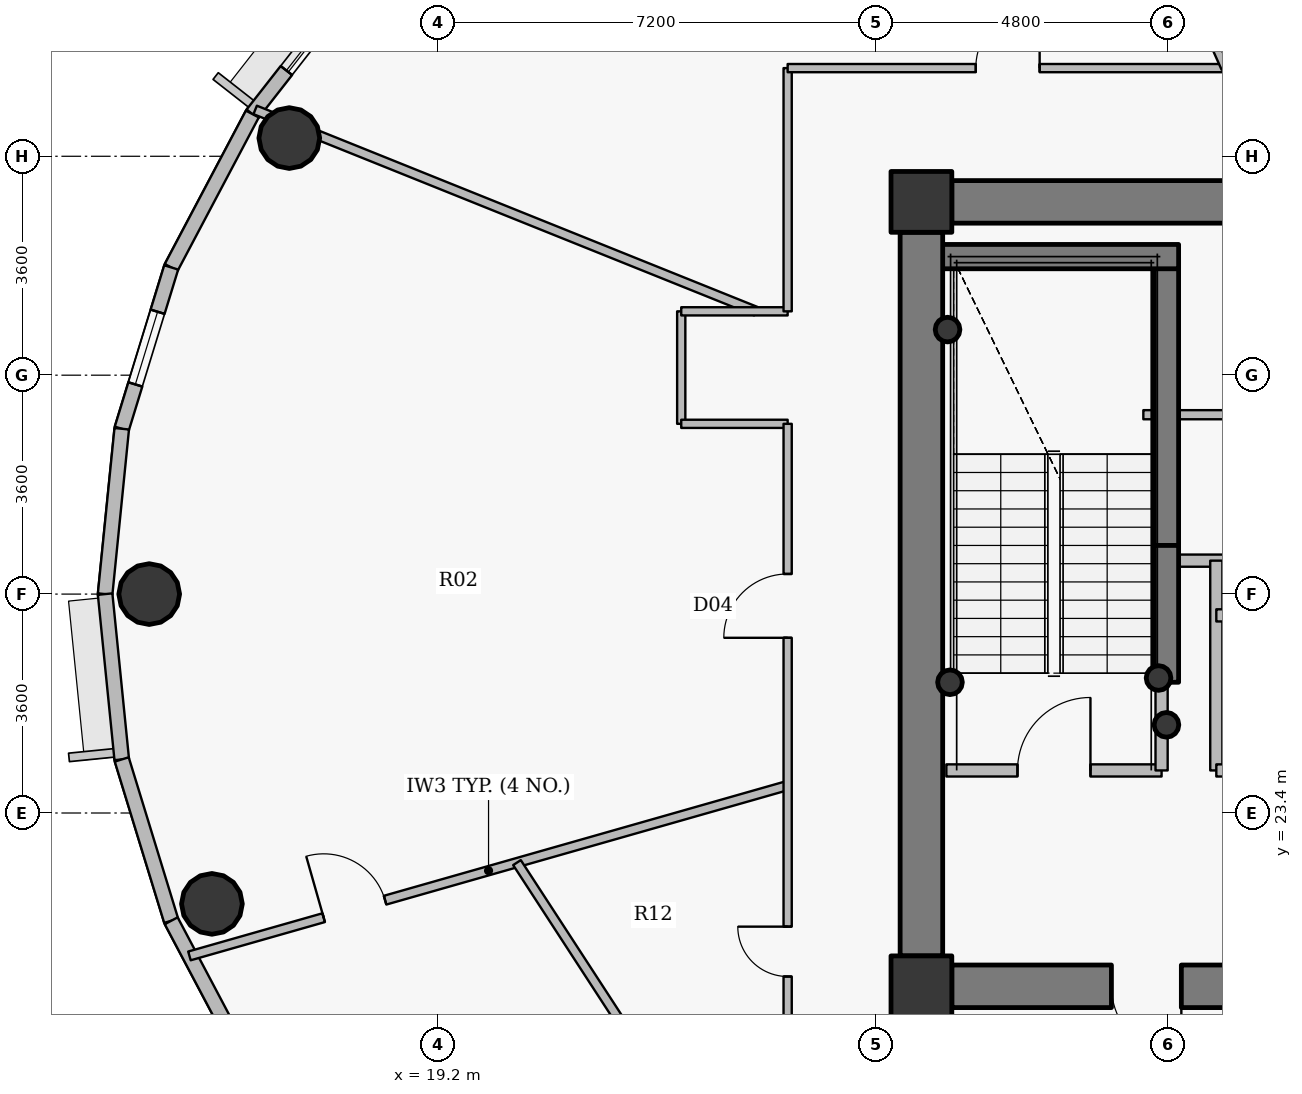
"""IFC4 building model, lengths in metres.
Left out: names, types, materials, properties, quantities, classifications, styles, units other than length and angle.
Written with IfcOpenShell. Run it as: python <this file> out.ifc"""

import sys

from ifc_helpers import new_model, si_unit, direction, frame, frame_2d, origin, origin_2d, place, context, subcontext, project, spatial, rectangle, hollow_circle, extrude, source, transform, mapped, element, fill, save


model = new_model("IFC4")
c1 = context("Model", 3, precision=1e-05, world=origin(), true_north=direction((0.0, 1.0)))
c2 = subcontext(c1, "Body", "Model", "MODEL_VIEW")
j1 = project(units=[si_unit("LENGTHUNIT", "METRE"), si_unit("PLANEANGLEUNIT", "RADIAN")], contexts=[c1])
p1 = place(None, origin())
s1 = spatial("IfcSite", under=j1, at=p1, CompositionType="ELEMENT")
p2 = place(p1, origin())
s2 = spatial("IfcBuilding", under=s1, at=p2, CompositionType="ELEMENT")
p3 = place(p2, frame((0.0, 0.0, 314.25)))
s3 = spatial("IfcBuildingStorey", under=s2, at=p3, CompositionType="ELEMENT", Elevation=314.25)
for number, where, z_axis, x_axis in (
    (1, (27.15, 20.55, 0.0), (0.0, 0.0, 1.0), (1.0, 0.0, 0.0)),
    (2, (27.15, 33.45, 0.0), (0.0, 0.0, 1.0), (1.0, 0.0, 0.0)),
):
    element("IfcColumn", number, at=place(p3, frame(where, z_axis=z_axis, x_axis=x_axis)), inside=s3, PredefinedType="COLUMN", context=c2, shape_type="SweptSolid", body=[
        extrude(rectangle(XDim=1.0, YDim=1.0, at=origin_2d()), origin(), (0.0, 0.0, 1.0), 3.75),
    ])
p4 = place(p3, frame((31.18, 27.8, 0.0), z_axis=(0.0, 0.0, 1.0), x_axis=(0.0, 1.0, 0.0)))
e3 = element("IfcWall", 3, at=p4, inside=s3, PredefinedType="SHEAR", context=c2, shape_type="SweptSolid", body=[
    extrude(rectangle(XDim=4.75, YDim=0.4, at=frame_2d((2.375, 0.0))), origin(), (0.0, 0.0, 1.0), 3.75),
])
p5 = place(p3, frame((27.25, 32.55, 0.0), z_axis=(0.0, 0.0, 1.0), x_axis=(1.0, 0.0, 0.0)))
e4 = element("IfcWall", 4, at=p5, inside=s3, PredefinedType="SHEAR", context=c2, shape_type="SweptSolid", body=[
    extrude(rectangle(XDim=4.13, YDim=0.4, at=frame_2d((2.065, 0.0))), origin(), (0.0, 0.0, 1.0), 3.75),
])
for number, where, z_axis, x_axis in (
    (5, (27.58, 31.35, 0.0), (0.0, 0.0, 1.0), (1.0, 0.0, 0.0)),
    (6, (31.05, 25.62, 0.0), (0.0, 0.0, 1.0), (1.0, 0.0, 0.0)),
    (7, (31.18, 24.85, 0.0), (0.0, 0.0, 1.0), (1.0, 0.0, 0.0)),
    (8, (27.62, 25.55, 0.0), (0.0, 0.0, 1.0), (1.0, 0.0, 0.0)),
):
    element("IfcColumn", number, at=place(p3, frame(where, z_axis=z_axis, x_axis=x_axis)), inside=s3, PredefinedType="COLUMN", context=c2, shape_type="SweptSolid", body=[
        extrude(hollow_circle(Radius=0.203, WallThickness=0.016, at=origin_2d()), origin(), (0.0, 0.0, 1.0), 3.75),
    ])
p6 = place(p3, frame((27.65, 33.45, 0.0), z_axis=(0.0, 0.0, 1.0), x_axis=(1.0, 0.0, 0.0)))
e9 = element("IfcWall", 9, at=p6, inside=s3, PredefinedType="SHEAR", context=c2, shape_type="SweptSolid", body=[
    extrude(rectangle(XDim=16.7, YDim=0.7, at=frame_2d((8.35, 0.0))), origin(), (0.0, 0.0, 1.0), 3.0),
])
p7 = place(p6, frame((12.775, 0.0, 0.0)))
e10 = element("IfcOpeningElement", 10, at=p7, cuts=e9, PredefinedType="OPENING", context=c2, shape_type="SweptSolid", body=[
    extrude(rectangle(XDim=1.15, YDim=2.15, at=origin_2d()), frame((0.575, 0.36, 1.075), z_axis=(0.0, -1.0, 0.0), x_axis=(1.0, 0.0, 0.0)), (0.0, 0.0, 1.0), 0.72),
])
p8 = place(p3, frame((44.35, 20.55, 0.0), z_axis=(0.0, 0.0, 1.0), x_axis=(-1.0, 0.0, 0.0)))
e11 = element("IfcWall", 11, at=p8, inside=s3, PredefinedType="SHEAR", context=c2, shape_type="SweptSolid", body=[
    extrude(rectangle(XDim=16.7, YDim=0.7, at=frame_2d((8.35, 0.0))), origin(), (0.0, 0.0, 1.0), 3.0),
])
p9 = place(p8, frame((12.925, 0.0, 0.0)))
e12 = element("IfcOpeningElement", 12, at=p9, cuts=e11, PredefinedType="OPENING", context=c2, shape_type="SweptSolid", body=[
    extrude(rectangle(XDim=1.15, YDim=2.15, at=origin_2d()), frame((0.575, 0.36, 1.075), z_axis=(0.0, -1.0, 0.0), x_axis=(1.0, 0.0, 0.0)), (0.0, 0.0, 1.0), 0.72),
])
p10 = place(p8, frame((9.1, 0.0, 0.0)))
e13 = element("IfcOpeningElement", 13, at=p10, cuts=e11, PredefinedType="OPENING", context=c2, shape_type="SweptSolid", body=[
    extrude(rectangle(XDim=1.15, YDim=2.15, at=origin_2d()), frame((0.575, 0.36, 1.075), z_axis=(0.0, -1.0, 0.0), x_axis=(1.0, 0.0, 0.0)), (0.0, 0.0, 1.0), 0.72),
])
p11 = place(p3, frame((27.15, 21.05, 0.0), z_axis=(0.0, 0.0, 1.0), x_axis=(0.0, 1.0, 0.0)))
e14 = element("IfcWall", 14, at=p11, inside=s3, PredefinedType="SHEAR", context=c2, shape_type="SweptSolid", body=[
    extrude(rectangle(XDim=11.9, YDim=0.7, at=frame_2d((5.95, 0.0))), origin(), (0.0, 0.0, 1.0), 3.0),
])
p12 = place(p3, frame((31.18, 25.55, 0.0), z_axis=(0.0, 0.0, 1.0), x_axis=(0.0, 1.0, 0.0)))
e15 = element("IfcWall", 15, at=p12, inside=s3, PredefinedType="SHEAR", context=c2, shape_type="SweptSolid", body=[
    extrude(rectangle(XDim=2.25, YDim=0.4, at=frame_2d((1.125, 0.0))), origin(), (0.0, 0.0, 1.0), 3.05),
])
for number, where, z_axis, x_axis in (
    (16, (16.754, 34.5, 0.0), (0.0, 0.0, 1.0), (1.0, 0.0, 0.0)),
    (17, (14.45, 27.0, 0.0), (0.0, 0.0, 1.0), (1.0, 0.0, 0.0)),
    (18, (15.481, 21.906, 0.0), (0.0, 0.0, 1.0), (1.0, 0.0, 0.0)),
):
    element("IfcColumn", number, at=place(p3, frame(where, z_axis=z_axis, x_axis=x_axis)), inside=s3, PredefinedType="COLUMN", context=c2, shape_type="SweptSolid", body=[
        extrude(hollow_circle(Radius=0.5, WallThickness=0.032, at=origin_2d()), origin(), (0.0, 0.0, 1.0), 3.75),
    ])
p13 = place(p3, frame((16.146, 34.895, 0.0), z_axis=(0.0, 0.0, 1.0), x_axis=(0.616337186556, 0.787482363275, 0.0)))
e19 = element("IfcWall", 19, at=p13, inside=s3, PredefinedType="SOLIDWALL", context=c2, shape_type="SweptSolid", body=[
    extrude(rectangle(XDim=2.958, YDim=0.24, at=frame_2d((1.479, 0.0))), origin(), (0.0, 0.0, 1.0), 3.45),
])
p14 = place(p13, frame((0.909, 0.0, 0.9)))
e20 = element("IfcOpeningElement", 20, at=p14, cuts=e19, PredefinedType="OPENING", context=c2, shape_type="SweptSolid", body=[
    extrude(rectangle(XDim=1.25, YDim=1.65, at=origin_2d()), frame((0.625, 0.13, 0.825), z_axis=(0.0, -1.0, 0.0), x_axis=(1.0, 0.0, 0.0)), (0.0, 0.0, 1.0), 0.26),
])
p15 = place(p3, frame((14.812, 32.372, 0.0), z_axis=(0.0, 0.0, 1.0), x_axis=(0.467628269026, 0.883925224218, 0.0)))
e21 = element("IfcWall", 21, at=p15, inside=s3, PredefinedType="SOLIDWALL", context=c2, shape_type="SweptSolid", body=[
    extrude(rectangle(XDim=2.854, YDim=0.24, at=frame_2d((1.427, 0.0))), origin(), (0.0, 0.0, 1.0), 3.45),
])
p16 = place(p3, frame((13.998, 29.719, 0.0), z_axis=(0.0, 0.0, 1.0), x_axis=(0.2931213403, 0.956075248012, 0.0)))
e22 = element("IfcWall", 22, at=p16, inside=s3, PredefinedType="SOLIDWALL", context=c2, shape_type="SweptSolid", body=[
    extrude(rectangle(XDim=2.775, YDim=0.24, at=frame_2d((1.388, 0.0))), origin(), (0.0, 0.0, 1.0), 3.45),
])
p17 = place(p16, frame((0.763, 0.0, 0.9)))
e23 = element("IfcOpeningElement", 23, at=p17, cuts=e22, PredefinedType="OPENING", context=c2, shape_type="SweptSolid", body=[
    extrude(rectangle(XDim=1.25, YDim=1.65, at=origin_2d()), frame((0.625, 0.13, 0.825), z_axis=(0.0, -1.0, 0.0), x_axis=(1.0, 0.0, 0.0)), (0.0, 0.0, 1.0), 0.26),
])
for number, where, z_axis, x_axis in (
    (24, (13.725, 27.0, 0.0), (0.0, 0.0, 1.0), (0.1, 0.995, 0.0)),
    (25, (13.998, 24.281, 0.0), (0.0, 0.0, 1.0), (-0.1, 0.995, 0.0)),
):
    element("IfcWall", number, at=place(p3, frame(where, z_axis=z_axis, x_axis=x_axis)), inside=s3, PredefinedType="SOLIDWALL", context=c2, shape_type="SweptSolid", body=[
        extrude(rectangle(XDim=2.733, YDim=0.24, at=frame_2d((1.366, 0.0))), origin(), (0.0, 0.0, 1.0), 3.45),
    ])
p18 = place(p3, frame((14.812, 21.628, 0.0), z_axis=(0.0, 0.0, 1.0), x_axis=(-0.2931213403, 0.956075248012, 0.0)))
e26 = element("IfcWall", 26, at=p18, inside=s3, PredefinedType="SOLIDWALL", context=c2, shape_type="SweptSolid", body=[
    extrude(rectangle(XDim=2.775, YDim=0.24, at=frame_2d((1.388, 0.0))), origin(), (0.0, 0.0, 1.0), 3.45),
])
p19 = place(p3, frame((16.146, 19.105, 0.0), z_axis=(0.0, 0.0, 1.0), x_axis=(-0.467628269026, 0.883925224218, 0.0)))
e27 = element("IfcWall", 27, at=p19, inside=s3, PredefinedType="SOLIDWALL", context=c2, shape_type="SweptSolid", body=[
    extrude(rectangle(XDim=2.854, YDim=0.24, at=frame_2d((1.427, 0.0))), origin(), (0.0, 0.0, 1.0), 3.45),
])
p20 = place(p3, frame((15.112, 21.05, 0.0), z_axis=(0.0, 0.0, 1.0), x_axis=(0.961740695875, 0.273961373004, 0.0)))
e28 = element("IfcWall", 28, at=p20, inside=s3, PredefinedType="PARTITIONING", context=c2, shape_type="SweptSolid", body=[
    extrude(rectangle(XDim=10.229, YDim=0.15, at=frame_2d((5.115, 0.0))), origin(), (0.0, 0.0, 1.0), 2.935),
])
p21 = place(p20, frame((2.295, 0.0, 0.0)))
e29 = element("IfcOpeningElement", 29, at=p21, cuts=e28, PredefinedType="OPENING", context=c2, shape_type="SweptSolid", body=[
    extrude(rectangle(XDim=1.05, YDim=2.15, at=origin_2d()), frame((0.525, 0.085, 1.075), z_axis=(0.0, -1.0, 0.0), x_axis=(1.0, 0.0, 0.0)), (0.0, 0.0, 1.0), 0.17),
])
p22 = place(p3, frame((16.193, 34.962, 0.0), z_axis=(0.0, 0.0, 1.0), x_axis=(0.927839710722, -0.372979183343, 0.0)))
e30 = element("IfcWall", 30, at=p22, inside=s3, PredefinedType="PARTITIONING", context=c2, shape_type="SweptSolid", body=[
    extrude(rectangle(XDim=8.874, YDim=0.15, at=frame_2d((4.437, 0.0))), origin(), (0.0, 0.0, 1.0), 2.985),
])
p23 = place(p3, frame((20.499, 22.584, 0.0), z_axis=(0.0, 0.0, 1.0), x_axis=(0.545422512832, -0.838161250892, 0.0)))
e31 = element("IfcWall", 31, at=p23, inside=s3, PredefinedType="PARTITIONING", context=c2, shape_type="SweptSolid", body=[
    extrude(rectangle(XDim=3.834, YDim=0.15, at=frame_2d((1.917, 0.0))), origin(), (0.0, 0.0, 1.0), 3.45),
])
p24 = place(p3, frame((23.2, 29.8, 0.0), z_axis=(0.0, 0.0, 1.0), x_axis=(0.0, 1.0, 0.0)))
e32 = element("IfcWall", 32, at=p24, inside=s3, PredefinedType="PARTITIONING", context=c2, shape_type="SweptSolid", body=[
    extrude(rectangle(XDim=1.85, YDim=0.135, at=frame_2d((0.925, 0.0))), origin(), (0.0, 0.0, 1.0), 3.45),
])
p25 = place(p3, frame((23.2, 29.8, 0.0), z_axis=(0.0, 0.0, 1.0), x_axis=(1.0, 0.0, 0.0)))
e33 = element("IfcWall", 33, at=p25, inside=s3, PredefinedType="PARTITIONING", context=c2, shape_type="SweptSolid", body=[
    extrude(rectangle(XDim=1.75, YDim=0.135, at=frame_2d((0.875, 0.0))), origin(), (0.0, 0.0, 1.0), 3.45),
])
p26 = place(p3, frame((23.2, 31.65, 0.0), z_axis=(0.0, 0.0, 1.0), x_axis=(1.0, 0.0, 0.0)))
e34 = element("IfcWall", 34, at=p26, inside=s3, PredefinedType="PARTITIONING", context=c2, shape_type="SweptSolid", body=[
    extrude(rectangle(XDim=1.75, YDim=0.135, at=frame_2d((0.875, 0.0))), origin(), (0.0, 0.0, 1.0), 2.985),
])
p27 = place(p3, frame((24.95, 18.35, 0.0), z_axis=(0.0, 0.0, 1.0), x_axis=(0.0, 1.0, 0.0)))
e35 = element("IfcWall", 35, at=p27, inside=s3, PredefinedType="PARTITIONING", context=c2, shape_type="SweptSolid", body=[
    extrude(rectangle(XDim=11.45, YDim=0.135, at=frame_2d((5.725, 0.0))), origin(), (0.0, 0.0, 1.0), 2.985),
])
p28 = place(p27, frame((7.931, 0.0, 0.0)))
e36 = element("IfcOpeningElement", 36, at=p28, cuts=e35, PredefinedType="OPENING", context=c2, shape_type="SweptSolid", body=[
    extrude(rectangle(XDim=1.05, YDim=2.15, at=origin_2d()), frame((0.525, 0.078, 1.075), z_axis=(0.0, -1.0, 0.0), x_axis=(1.0, 0.0, 0.0)), (0.0, 0.0, 1.0), 0.155),
])
p29 = place(p27, frame((2.361, 0.0, 0.0)))
e37 = element("IfcOpeningElement", 37, at=p29, cuts=e35, PredefinedType="OPENING", context=c2, shape_type="SweptSolid", body=[
    extrude(rectangle(XDim=0.82, YDim=2.1, at=origin_2d()), frame((0.41, 0.078, 1.05), z_axis=(0.0, -1.0, 0.0), x_axis=(1.0, 0.0, 0.0)), (0.0, 0.0, 1.0), 0.155),
])
p30 = place(p3, frame((24.95, 31.65, 0.0), z_axis=(0.0, 0.0, 1.0), x_axis=(0.0, 1.0, 0.0)))
e38 = element("IfcWall", 38, at=p30, inside=s3, PredefinedType="PARTITIONING", context=c2, shape_type="SweptSolid", body=[
    extrude(rectangle(XDim=4.0, YDim=0.135, at=frame_2d((2.0, 0.0))), origin(), (0.0, 0.0, 1.0), 2.985),
])
p31 = place(p3, frame((24.95, 35.65, 0.0), z_axis=(0.0, 0.0, 1.0), x_axis=(1.0, 0.0, 0.0)))
e39 = element("IfcWall", 39, at=p31, inside=s3, PredefinedType="PARTITIONING", context=c2, shape_type="SweptSolid", body=[
    extrude(rectangle(XDim=10.1, YDim=0.135, at=frame_2d((5.05, 0.0))), origin(), (0.0, 0.0, 1.0), 2.985),
])
p32 = place(p31, frame((3.094, 0.0, 0.0)))
e40 = element("IfcOpeningElement", 40, at=p32, cuts=e39, PredefinedType="OPENING", context=c2, shape_type="SweptSolid", body=[
    extrude(rectangle(XDim=1.05, YDim=2.15, at=origin_2d()), frame((0.525, 0.078, 1.075), z_axis=(0.0, -1.0, 0.0), x_axis=(1.0, 0.0, 0.0)), (0.0, 0.0, 1.0), 0.155),
])
p33 = place(p3, frame((27.56, 24.1, 0.0), z_axis=(0.0, 0.0, 1.0), x_axis=(1.0, 0.0, 0.0)))
e41 = element("IfcWall", 41, at=p33, inside=s3, PredefinedType="PARTITIONING", context=c2, shape_type="SweptSolid", body=[
    extrude(rectangle(XDim=3.54, YDim=0.2, at=frame_2d((1.77, 0.0))), origin(), (0.0, 0.0, 1.0), 3.45),
])
p34 = place(p33, frame((1.17, 0.0, 0.0)))
e42 = element("IfcOpeningElement", 42, at=p34, cuts=e41, PredefinedType="OPENING", context=c2, shape_type="SweptSolid", body=[
    extrude(rectangle(XDim=1.2, YDim=2.15, at=origin_2d()), frame((0.6, 0.11, 1.075), z_axis=(0.0, -1.0, 0.0), x_axis=(1.0, 0.0, 0.0)), (0.0, 0.0, 1.0), 0.22),
])
p35 = place(p3, frame((28.686, 43.428, 0.0), z_axis=(0.0, 0.0, 1.0), x_axis=(0.406736980157, -0.913545307564, 0.0)))
e43 = element("IfcWall", 43, at=p35, inside=s3, PredefinedType="PARTITIONING", context=c2, shape_type="SweptSolid", body=[
    extrude(rectangle(XDim=8.514, YDim=0.135, at=frame_2d((4.257, 0.0))), origin(), (0.0, 0.0, 1.0), 2.985),
])
p36 = place(p3, frame((30.8, 29.95, 0.0), z_axis=(0.0, 0.0, 1.0), x_axis=(1.0, 0.0, 0.0)))
e44 = element("IfcWall", 44, at=p36, inside=s3, PredefinedType="PARTITIONING", context=c2, shape_type="SweptSolid", body=[
    extrude(rectangle(XDim=3.1, YDim=0.15, at=frame_2d((1.55, 0.0))), origin(), (0.0, 0.0, 1.0), 3.035),
])
p37 = place(p3, frame((31.1, 24.1, 0.0), z_axis=(0.0, 0.0, 1.0), x_axis=(0.0, 1.0, 0.0)))
e45 = element("IfcWall", 45, at=p37, inside=s3, PredefinedType="PARTITIONING", context=c2, shape_type="SweptSolid", body=[
    extrude(rectangle(XDim=1.44, YDim=0.2, at=frame_2d((0.72, 0.0))), origin(), (0.0, 0.0, 1.0), 3.45),
])
p38 = place(p3, frame((31.1, 27.55, 0.0), z_axis=(0.0, 0.0, 1.0), x_axis=(1.0, 0.0, 0.0)))
e46 = element("IfcWall", 46, at=p38, inside=s3, PredefinedType="PARTITIONING", context=c2, shape_type="SweptSolid", body=[
    extrude(rectangle(XDim=2.8, YDim=0.2, at=frame_2d((1.4, 0.0))), origin(), (0.0, 0.0, 1.0), 3.035),
])
p39 = place(p38, frame((1.5, 0.0, 0.0)))
e47 = element("IfcOpeningElement", 47, at=p39, cuts=e46, PredefinedType="OPENING", context=c2, shape_type="SweptSolid", body=[
    extrude(rectangle(XDim=0.66, YDim=2.05, at=origin_2d()), frame((0.33, 0.11, 1.025), z_axis=(0.0, -1.0, 0.0), x_axis=(1.0, 0.0, 0.0)), (0.0, 0.0, 1.0), 0.22),
])
p40 = place(p3, frame((32.0, 24.1, 0.0), z_axis=(0.0, 0.0, 1.0), x_axis=(0.0, 1.0, 0.0)))
e48 = element("IfcWall", 48, at=p40, inside=s3, PredefinedType="PARTITIONING", context=c2, shape_type="SweptSolid", body=[
    extrude(rectangle(XDim=3.45, YDim=0.2, at=frame_2d((1.725, 0.0))), origin(), (0.0, 0.0, 1.0), 3.45),
])
p41 = place(p3, frame((32.0, 24.1, 0.0), z_axis=(0.0, 0.0, 1.0), x_axis=(1.0, 0.0, 0.0)))
e49 = element("IfcWall", 49, at=p41, inside=s3, PredefinedType="PARTITIONING", context=c2, shape_type="SweptSolid", body=[
    extrude(rectangle(XDim=1.9, YDim=0.2, at=frame_2d((0.95, 0.0))), origin(), (0.0, 0.0, 1.0), 3.035),
])
p42 = place(p41, frame((0.375, 0.0, 0.0)))
e50 = element("IfcOpeningElement", 50, at=p42, cuts=e49, PredefinedType="OPENING", context=c2, shape_type="SweptSolid", body=[
    extrude(rectangle(XDim=1.15, YDim=2.15, at=origin_2d()), frame((0.575, 0.11, 1.075), z_axis=(0.0, -1.0, 0.0), x_axis=(1.0, 0.0, 0.0)), (0.0, 0.0, 1.0), 0.22),
])
p43 = place(p3, frame((32.0, 26.65, 0.0), z_axis=(0.0, 0.0, 1.0), x_axis=(1.0, 0.0, 0.0)))
e51 = element("IfcWall", 51, at=p43, inside=s3, PredefinedType="PARTITIONING", context=c2, shape_type="SweptSolid", body=[
    extrude(rectangle(XDim=1.9, YDim=0.2, at=frame_2d((0.95, 0.0))), origin(), (0.0, 0.0, 1.0), 3.035),
])
p44 = place(p3, frame((27.64, 33.8, 0.0), z_axis=(0.0, 0.0, 1.0), x_axis=(-1.0, 0.0, 0.0)))
e52 = element("IfcWall", 52, at=p44, inside=s3, PredefinedType="PARTITIONING", context=c2, shape_type="SweptSolid", body=[
    extrude(rectangle(XDim=0.84, YDim=0.135, at=frame_2d((0.42, 0.0))), origin(), (0.0, 0.0, 1.0), 2.985),
])
p45 = place(p3, frame((26.8, 33.492, 0.0), z_axis=(0.0, 0.0, 1.0), x_axis=(0.0, -1.0, 0.0)))
e53 = element("IfcWall", 53, at=p45, inside=s3, PredefinedType="PARTITIONING", context=c2, shape_type="SweptSolid", body=[
    extrude(rectangle(XDim=0.532, YDim=0.135, at=frame_2d((0.266, 0.0))), origin(), (0.0, 0.0, 1.0), 3.45),
])
p46 = place(p3, frame((26.8, 21.04, 0.0), z_axis=(0.0, 0.0, 1.0), x_axis=(0.0, -1.0, 0.0)))
e54 = element("IfcWall", 54, at=p46, inside=s3, PredefinedType="PARTITIONING", context=c2, shape_type="SweptSolid", body=[
    extrude(rectangle(XDim=0.84, YDim=0.135, at=frame_2d((0.42, 0.0))), origin(), (0.0, 0.0, 1.0), 2.985),
])
p47 = place(p3, frame((27.107, 20.2, 0.0), z_axis=(0.0, 0.0, 1.0), x_axis=(1.0, 0.0, 0.0)))
e55 = element("IfcWall", 55, at=p47, inside=s3, PredefinedType="PARTITIONING", context=c2, shape_type="SweptSolid", body=[
    extrude(rectangle(XDim=0.532, YDim=0.135, at=frame_2d((0.266, 0.0))), origin(), (0.0, 0.0, 1.0), 2.985),
])
m1 = source(origin(), c2, "Body", "SweptSolid", [
    extrude(rectangle(XDim=1.25, YDim=1.65, at=origin_2d()), frame((0.625, 0.03, 0.825), z_axis=(0.0, -1.0, 0.0), x_axis=(1.0, 0.0, 0.0)), (0.0, 0.0, 1.0), 0.06),
])
p48 = place(p14, origin())
e56 = element("IfcWindow", 56, at=p48, inside=s3, PartitioningType="SINGLE_PANEL", PredefinedType="WINDOW", context=c2, shape_type="MappedRepresentation", body=[
    mapped(m1, transform((0.0, 0.0, 0.0), x_axis=(1.0, 0.0, 0.0), y_axis=(0.0, 1.0, 0.0), z_axis=(0.0, 0.0, 1.0), scale=1.0)),
])
fill(e20, e56)
p49 = place(p17, origin())
e57 = element("IfcWindow", 57, at=p49, inside=s3, PartitioningType="SINGLE_PANEL", PredefinedType="WINDOW", context=c2, shape_type="MappedRepresentation", body=[
    mapped(m1, transform((0.0, 0.0, 0.0), x_axis=(1.0, 0.0, 0.0), y_axis=(0.0, 1.0, 0.0), z_axis=(0.0, 0.0, 1.0), scale=1.0)),
])
fill(e23, e57)
m2 = source(origin(), c2, "Body", "SweptSolid", [
    extrude(rectangle(XDim=1.15, YDim=2.15, at=origin_2d()), frame((0.575, 0.025, 1.075), z_axis=(0.0, -1.0, 0.0), x_axis=(1.0, 0.0, 0.0)), (0.0, 0.0, 1.0), 0.05),
])
p50 = place(p9, origin())
e58 = element("IfcDoor", 58, at=p50, inside=s3, OperationType="SINGLE_SWING_LEFT", PredefinedType="DOOR", context=c2, shape_type="MappedRepresentation", body=[
    mapped(m2, transform((0.0, 0.0, 0.0), x_axis=(1.0, 0.0, 0.0), y_axis=(0.0, 1.0, 0.0), z_axis=(0.0, 0.0, 1.0), scale=1.0)),
])
fill(e12, e58)
m3 = source(origin(), c2, "Body", "SweptSolid", [
    extrude(rectangle(XDim=1.2, YDim=2.15, at=origin_2d()), frame((0.6, 0.025, 1.075), z_axis=(0.0, -1.0, 0.0), x_axis=(1.0, 0.0, 0.0)), (0.0, 0.0, 1.0), 0.05),
])
p51 = place(p34, origin())
e59 = element("IfcDoor", 59, at=p51, inside=s3, OperationType="SINGLE_SWING_RIGHT", PredefinedType="DOOR", context=c2, shape_type="MappedRepresentation", body=[
    mapped(m3, transform((0.0, 0.0, 0.0), x_axis=(1.0, 0.0, 0.0), y_axis=(0.0, 1.0, 0.0), z_axis=(0.0, 0.0, 1.0), scale=1.0)),
])
fill(e42, e59)
m4 = source(origin(), c2, "Body", "SweptSolid", [
    extrude(rectangle(XDim=1.05, YDim=2.15, at=origin_2d()), frame((0.525, 0.025, 1.075), z_axis=(0.0, -1.0, 0.0), x_axis=(1.0, 0.0, 0.0)), (0.0, 0.0, 1.0), 0.05),
])
p52 = place(p32, origin())
e60 = element("IfcDoor", 60, at=p52, inside=s3, OperationType="SINGLE_SWING_RIGHT", PredefinedType="DOOR", context=c2, shape_type="MappedRepresentation", body=[
    mapped(m4, transform((0.0, 0.0, 0.0), x_axis=(1.0, 0.0, 0.0), y_axis=(0.0, 1.0, 0.0), z_axis=(0.0, 0.0, 1.0), scale=1.0)),
])
fill(e40, e60)
p53 = place(p28, origin())
e61 = element("IfcDoor", 61, at=p53, inside=s3, OperationType="SINGLE_SWING_LEFT", PredefinedType="DOOR", context=c2, shape_type="MappedRepresentation", body=[
    mapped(m4, transform((0.0, 0.0, 0.0), x_axis=(1.0, 0.0, 0.0), y_axis=(0.0, 1.0, 0.0), z_axis=(0.0, 0.0, 1.0), scale=1.0)),
])
fill(e36, e61)
m5 = source(origin(), c2, "Body", "SweptSolid", [
    extrude(rectangle(XDim=0.82, YDim=2.1, at=origin_2d()), frame((0.41, 0.025, 1.05), z_axis=(0.0, -1.0, 0.0), x_axis=(1.0, 0.0, 0.0)), (0.0, 0.0, 1.0), 0.05),
])
p54 = place(p29, origin())
e62 = element("IfcDoor", 62, at=p54, inside=s3, OperationType="SINGLE_SWING_RIGHT", PredefinedType="DOOR", context=c2, shape_type="MappedRepresentation", body=[
    mapped(m5, transform((0.0, 0.0, 0.0), x_axis=(1.0, 0.0, 0.0), y_axis=(0.0, 1.0, 0.0), z_axis=(0.0, 0.0, 1.0), scale=1.0)),
])
fill(e37, e62)
p55 = place(p21, origin())
e63 = element("IfcDoor", 63, at=p55, inside=s3, OperationType="SINGLE_SWING_LEFT", PredefinedType="DOOR", context=c2, shape_type="MappedRepresentation", body=[
    mapped(m4, transform((0.0, 0.0, 0.0), x_axis=(1.0, 0.0, 0.0), y_axis=(0.0, 1.0, 0.0), z_axis=(0.0, 0.0, 1.0), scale=1.0)),
])
fill(e29, e63)
save(model, sys.argv[1])
